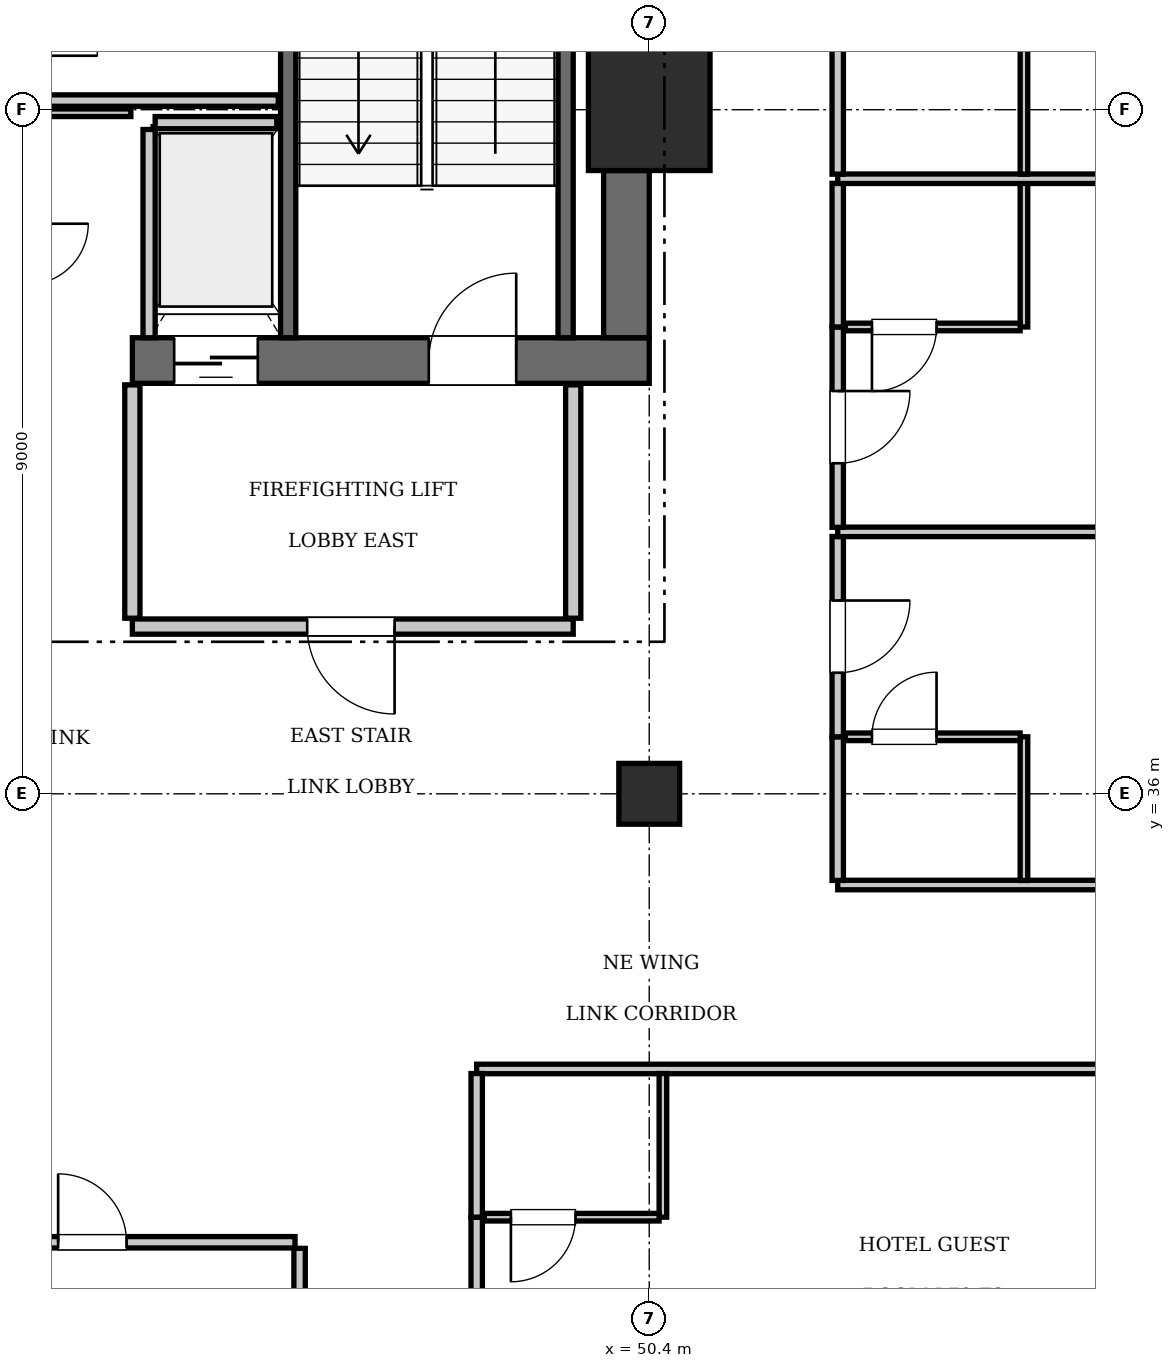
"""IFC4 building model, lengths in metres.
Left out: names, types, materials, properties, quantities, classifications, styles, units other than length and angle.
Written with IfcOpenShell. Run it as: python <this file> out.ifc"""

import sys

from ifc_helpers import new_model, si_unit, direction, frame, frame_2d, origin, origin_2d, place, context, subcontext, project, spatial, rectangle, extrude, element, fill, save


model = new_model("IFC4")
c1 = context("Model", 3, precision=1e-05, world=origin(), true_north=direction((0.0, 1.0)))
c2 = subcontext(c1, "Body", "Model", "MODEL_VIEW")
j1 = project(units=[si_unit("LENGTHUNIT", "METRE"), si_unit("PLANEANGLEUNIT", "RADIAN")], contexts=[c1])
p1 = place(None, origin())
s1 = spatial("IfcSite", under=j1, at=p1, CompositionType="ELEMENT")
p2 = place(p1, origin())
s2 = spatial("IfcBuilding", under=s1, at=p2, CompositionType="ELEMENT")
p3 = place(p2, frame((0.0, 0.0, 285.6)))
s3 = spatial("IfcBuildingStorey", under=s2, at=p3, CompositionType="ELEMENT", Elevation=285.6)
p4 = place(p3, frame((50.4, 45.0, 0.0), z_axis=(0.0, 0.0, 1.0), x_axis=(1.0, 0.0, 0.0)))
e1 = element("IfcColumn", 1, at=p4, inside=s3, PredefinedType="COLUMN", context=c2, shape_type="SweptSolid", body=[
    extrude(rectangle(XDim=1.6, YDim=1.6, at=origin_2d()), origin(), (0.0, 0.0, 1.0), 3.85),
])
p5 = place(p3, frame((43.6, 41.7, 0.0), z_axis=(0.0, 0.0, 1.0), x_axis=(1.0, 0.0, 0.0)))
e2 = element("IfcWall", 2, at=p5, inside=s3, PredefinedType="SHEAR", context=c2, shape_type="SweptSolid", body=[
    extrude(rectangle(XDim=6.8, YDim=0.6, at=frame_2d((3.4, 0.0))), origin(), (0.0, 0.0, 1.0), 3.85),
])
p6 = place(p5, frame((3.9, 0.0, 0.0)))
e3 = element("IfcOpeningElement", 3, at=p6, cuts=e2, PredefinedType="OPENING", context=c2, shape_type="SweptSolid", body=[
    extrude(rectangle(XDim=1.15, YDim=2.15, at=frame_2d((0.575, 1.075))), frame((0.0, 0.31, 0.0), z_axis=(0.0, -1.0, 0.0), x_axis=(1.0, 0.0, 0.0)), (0.0, 0.0, 1.0), 0.62),
])
p7 = place(p5, frame((0.55, 0.0, 0.0)))
e4 = element("IfcOpeningElement", 4, at=p7, cuts=e2, PredefinedType="OPENING", context=c2, shape_type="SweptSolid", body=[
    extrude(rectangle(XDim=1.1, YDim=2.2, at=frame_2d((0.55, 1.1))), frame((0.0, 0.31, 0.0), z_axis=(0.0, -1.0, 0.0), x_axis=(1.0, 0.0, 0.0)), (0.0, 0.0, 1.0), 0.62),
])
p8 = place(p3, frame((50.1, 42.0, 0.0), z_axis=(0.0, 0.0, 1.0), x_axis=(0.0, 1.0, 0.0)))
e5 = element("IfcWall", 5, at=p8, inside=s3, PredefinedType="SHEAR", context=c2, shape_type="SweptSolid", body=[
    extrude(rectangle(XDim=2.2, YDim=0.6, at=frame_2d((1.1, 0.0))), origin(), (0.0, 0.0, 1.0), 3.85),
])
p9 = place(p3, frame((50.4, 36.0, 0.0), z_axis=(0.0, 0.0, 1.0), x_axis=(1.0, 0.0, 0.0)))
e6 = element("IfcColumn", 6, at=p9, inside=s3, PredefinedType="COLUMN", context=c2, shape_type="SweptSolid", body=[
    extrude(rectangle(XDim=0.8, YDim=0.8, at=origin_2d()), origin(), (0.0, 0.0, 1.0), 3.85),
])
p10 = place(p3, frame((45.65, 42.0, 0.0), z_axis=(0.0, 0.0, 1.0), x_axis=(0.0, 1.0, 0.0)))
e7 = element("IfcWall", 7, at=p10, inside=s3, PredefinedType="SOLIDWALL", context=c2, shape_type="SweptSolid", body=[
    extrude(rectangle(XDim=9.15, YDim=0.2, at=frame_2d((4.575, 0.0))), origin(), (0.0, 0.0, 1.0), 3.61),
])
p11 = place(p3, frame((49.3, 42.0, 0.0), z_axis=(0.0, 0.0, 1.0), x_axis=(0.0, 1.0, 0.0)))
e8 = element("IfcWall", 8, at=p11, inside=s3, PredefinedType="SOLIDWALL", context=c2, shape_type="SweptSolid", body=[
    extrude(rectangle(XDim=9.12, YDim=0.2, at=frame_2d((4.56, 0.0))), origin(), (0.0, 0.0, 1.0), 3.61),
])
p12 = place(p3, frame((43.9, 44.83, 0.0), z_axis=(0.0, 0.0, 1.0), x_axis=(1.0, 0.0, 0.0)))
e9 = element("IfcWall", 9, at=p12, inside=s3, PredefinedType="SOLIDWALL", context=c2, shape_type="SweptSolid", body=[
    extrude(rectangle(XDim=1.6, YDim=0.16, at=frame_2d((0.8, 0.0))), origin(), (0.0, 0.0, 1.0), 3.61),
])
p13 = place(p3, frame((43.82, 42.0, 0.0), z_axis=(0.0, 0.0, 1.0), x_axis=(0.0, 1.0, 0.0)))
e10 = element("IfcWall", 10, at=p13, inside=s3, PredefinedType="SOLIDWALL", context=c2, shape_type="SweptSolid", body=[
    extrude(rectangle(XDim=2.74, YDim=0.16, at=frame_2d((1.37, 0.0))), origin(), (0.0, 0.0, 1.0), 3.61),
])
p14 = place(p3, frame((43.6, 38.2, 0.0), z_axis=(0.0, 0.0, 1.0), x_axis=(1.0, 0.0, 0.0)))
e11 = element("IfcWall", 11, at=p14, inside=s3, PredefinedType="PARTITIONING", context=c2, shape_type="SweptSolid", body=[
    extrude(rectangle(XDim=5.8, YDim=0.2, at=frame_2d((2.9, 0.0))), origin(), (0.0, 0.0, 1.0), 3.61),
])
p15 = place(p14, frame((2.3, 0.0, 0.0)))
e12 = element("IfcOpeningElement", 12, at=p15, cuts=e11, PredefinedType="OPENING", context=c2, shape_type="SweptSolid", body=[
    extrude(rectangle(XDim=1.15, YDim=2.15, at=frame_2d((0.575, 1.075))), frame((0.0, 0.11, 0.0), z_axis=(0.0, -1.0, 0.0), x_axis=(1.0, 0.0, 0.0)), (0.0, 0.0, 1.0), 0.22),
])
for number, where, z_axis, x_axis in (
    (13, (43.6, 38.31, 0.0), (0.0, 0.0, 1.0), (0.0, 1.0, 0.0)),
    (14, (49.4, 38.31, 0.0), (0.0, 0.0, 1.0), (0.0, 1.0, 0.0)),
):
    element("IfcWall", number, at=place(p3, frame(where, z_axis=z_axis, x_axis=x_axis)), inside=s3, PredefinedType="PARTITIONING", context=c2, shape_type="SweptSolid", body=[
        extrude(rectangle(XDim=3.07, YDim=0.2, at=frame_2d((1.535, 0.0))), origin(), (0.0, 0.0, 1.0), 3.61),
    ])
p16 = place(p3, frame((42.28, 44.96, 0.0), z_axis=(0.0, 0.0, 1.0), x_axis=(1.0, 0.0, 0.0)))
e15 = element("IfcWall", 15, at=p16, inside=s3, PredefinedType="PARTITIONING", context=c2, shape_type="SweptSolid", body=[
    extrude(rectangle(XDim=1.3, YDim=0.1, at=frame_2d((0.65, 0.0))), origin(), (0.0, 0.0, 1.0), 3.61),
])
p17 = place(p3, frame((42.38, 45.12, 0.0), z_axis=(0.0, 0.0, 1.0), x_axis=(1.0, 0.0, 0.0)))
e16 = element("IfcWall", 16, at=p17, inside=s3, PredefinedType="PARTITIONING", context=c2, shape_type="SweptSolid", body=[
    extrude(rectangle(XDim=3.14, YDim=0.15, at=frame_2d((1.57, 0.0))), origin(), (0.0, 0.0, 1.0), 3.61),
])
p18 = place(p3, frame((45.8, 22.33, 0.0), z_axis=(0.0, 0.0, 1.0), x_axis=(0.0, 1.0, 0.0)))
e17 = element("IfcWall", 17, at=p18, inside=s3, PredefinedType="PARTITIONING", context=c2, shape_type="SweptSolid", body=[
    extrude(rectangle(XDim=7.69, YDim=0.15, at=frame_2d((3.845, 0.0))), origin(), (0.0, 0.0, 1.0), 3.61),
])
p19 = place(p3, frame((40.407, 30.1, 0.0), z_axis=(0.0, 0.0, 1.0), x_axis=(1.0, 0.0, 0.0)))
e18 = element("IfcWall", 18, at=p19, inside=s3, PredefinedType="PARTITIONING", context=c2, shape_type="SweptSolid", body=[
    extrude(rectangle(XDim=5.333, YDim=0.15, at=frame_2d((2.667, 0.0))), origin(), (0.0, 0.0, 1.0), 3.61),
])
p20 = place(p19, frame((2.217, 0.0, 0.0)))
e19 = element("IfcOpeningElement", 19, at=p20, cuts=e18, PredefinedType="OPENING", context=c2, shape_type="SweptSolid", body=[
    extrude(rectangle(XDim=0.9, YDim=2.1, at=frame_2d((0.45, 1.05))), frame((0.0, 0.085, 0.0), z_axis=(0.0, -1.0, 0.0), x_axis=(1.0, 0.0, 0.0)), (0.0, 0.0, 1.0), 0.17),
])
p21 = place(p3, frame((48.13, 32.38, 0.0), z_axis=(0.0, 0.0, 1.0), x_axis=(1.0, 0.0, 0.0)))
e20 = element("IfcWall", 20, at=p21, inside=s3, PredefinedType="PARTITIONING", context=c2, shape_type="SweptSolid", body=[
    extrude(rectangle(XDim=11.97, YDim=0.125, at=frame_2d((5.985, 0.0))), origin(), (0.0, 0.0, 1.0), 3.61),
])
p22 = place(p3, frame((48.13, 27.4, 0.0), z_axis=(0.0, 0.0, 1.0), x_axis=(0.0, 1.0, 0.0)))
e21 = element("IfcWall", 21, at=p22, inside=s3, PredefinedType="PARTITIONING", context=c2, shape_type="SweptSolid", body=[
    extrude(rectangle(XDim=3.03, YDim=0.15, at=frame_2d((1.515, 0.0))), origin(), (0.0, 0.0, 1.0), 3.61),
])
p23 = place(p22, frame((1.04, 0.0, 0.0)))
e22 = element("IfcOpeningElement", 22, at=p23, cuts=e21, PredefinedType="OPENING", context=c2, shape_type="SweptSolid", body=[
    extrude(rectangle(XDim=0.95, YDim=2.15, at=frame_2d((0.475, 1.075))), frame((0.0, 0.085, 0.0), z_axis=(0.0, -1.0, 0.0), x_axis=(1.0, 0.0, 0.0)), (0.0, 0.0, 1.0), 0.17),
])
p24 = place(p3, frame((48.13, 30.43, 0.0), z_axis=(0.0, 0.0, 1.0), x_axis=(0.0, 1.0, 0.0)))
e23 = element("IfcWall", 23, at=p24, inside=s3, PredefinedType="PARTITIONING", context=c2, shape_type="SweptSolid", body=[
    extrude(rectangle(XDim=1.89, YDim=0.15, at=frame_2d((0.945, 0.0))), origin(), (0.0, 0.0, 1.0), 3.61),
])
p25 = place(p3, frame((50.58, 30.43, 0.0), z_axis=(0.0, 0.0, 1.0), x_axis=(0.0, 1.0, 0.0)))
e24 = element("IfcWall", 24, at=p25, inside=s3, PredefinedType="PARTITIONING", context=c2, shape_type="SweptSolid", body=[
    extrude(rectangle(XDim=1.89, YDim=0.1, at=frame_2d((0.945, 0.0))), origin(), (0.0, 0.0, 1.0), 3.61),
])
p26 = place(p3, frame((48.23, 30.43, 0.0), z_axis=(0.0, 0.0, 1.0), x_axis=(1.0, 0.0, 0.0)))
e25 = element("IfcWall", 25, at=p26, inside=s3, PredefinedType="PARTITIONING", context=c2, shape_type="SweptSolid", body=[
    extrude(rectangle(XDim=2.3, YDim=0.1, at=frame_2d((1.15, 0.0))), origin(), (0.0, 0.0, 1.0), 3.61),
])
p27 = place(p26, frame((0.35, 0.0, 0.0)))
e26 = element("IfcOpeningElement", 26, at=p27, cuts=e25, PredefinedType="OPENING", context=c2, shape_type="SweptSolid", body=[
    extrude(rectangle(XDim=0.85, YDim=2.1, at=frame_2d((0.425, 1.05))), frame((0.0, 0.06, 0.0), z_axis=(0.0, -1.0, 0.0), x_axis=(1.0, 0.0, 0.0)), (0.0, 0.0, 1.0), 0.12),
])
p28 = place(p3, frame((52.88, 34.8, 0.0), z_axis=(0.0, 0.0, 1.0), x_axis=(1.0, 0.0, 0.0)))
e27 = element("IfcWall", 27, at=p28, inside=s3, PredefinedType="PARTITIONING", context=c2, shape_type="SweptSolid", body=[
    extrude(rectangle(XDim=7.22, YDim=0.125, at=frame_2d((3.61, 0.0))), origin(), (0.0, 0.0, 1.0), 3.61),
])
p29 = place(p3, frame((52.88, 34.86, 0.0), z_axis=(0.0, 0.0, 1.0), x_axis=(0.0, 1.0, 0.0)))
e28 = element("IfcWall", 28, at=p29, inside=s3, PredefinedType="PARTITIONING", context=c2, shape_type="SweptSolid", body=[
    extrude(rectangle(XDim=1.89, YDim=0.15, at=frame_2d((0.945, 0.0))), origin(), (0.0, 0.0, 1.0), 3.61),
])
p30 = place(p3, frame((52.88, 36.75, 0.0), z_axis=(0.0, 0.0, 1.0), x_axis=(0.0, 1.0, 0.0)))
e29 = element("IfcWall", 29, at=p30, inside=s3, PredefinedType="PARTITIONING", context=c2, shape_type="SweptSolid", body=[
    extrude(rectangle(XDim=2.636, YDim=0.15, at=frame_2d((1.318, 0.0))), origin(), (0.0, 0.0, 1.0), 3.61),
])
p31 = place(p30, frame((0.843, 0.0, 0.0)))
e30 = element("IfcOpeningElement", 30, at=p31, cuts=e29, PredefinedType="OPENING", context=c2, shape_type="SweptSolid", body=[
    extrude(rectangle(XDim=0.95, YDim=2.15, at=frame_2d((0.475, 1.075))), frame((0.0, 0.085, 0.0), z_axis=(0.0, -1.0, 0.0), x_axis=(1.0, 0.0, 0.0)), (0.0, 0.0, 1.0), 0.17),
])
p32 = place(p3, frame((55.33, 34.86, 0.0), z_axis=(0.0, 0.0, 1.0), x_axis=(0.0, 1.0, 0.0)))
e31 = element("IfcWall", 31, at=p32, inside=s3, PredefinedType="PARTITIONING", context=c2, shape_type="SweptSolid", body=[
    extrude(rectangle(XDim=1.89, YDim=0.1, at=frame_2d((0.945, 0.0))), origin(), (0.0, 0.0, 1.0), 3.61),
])
p33 = place(p3, frame((52.98, 36.75, 0.0), z_axis=(0.0, 0.0, 1.0), x_axis=(1.0, 0.0, 0.0)))
e32 = element("IfcWall", 32, at=p33, inside=s3, PredefinedType="PARTITIONING", context=c2, shape_type="SweptSolid", body=[
    extrude(rectangle(XDim=2.3, YDim=0.1, at=frame_2d((1.15, 0.0))), origin(), (0.0, 0.0, 1.0), 3.61),
])
p34 = place(p33, frame((0.35, 0.0, 0.0)))
e33 = element("IfcOpeningElement", 33, at=p34, cuts=e32, PredefinedType="OPENING", context=c2, shape_type="SweptSolid", body=[
    extrude(rectangle(XDim=0.85, YDim=2.1, at=frame_2d((0.425, 1.05))), frame((0.0, 0.06, 0.0), z_axis=(0.0, -1.0, 0.0), x_axis=(1.0, 0.0, 0.0)), (0.0, 0.0, 1.0), 0.12),
])
p35 = place(p3, frame((52.88, 39.446, 0.0), z_axis=(0.0, 0.0, 1.0), x_axis=(1.0, 0.0, 0.0)))
e34 = element("IfcWall", 34, at=p35, inside=s3, PredefinedType="PARTITIONING", context=c2, shape_type="SweptSolid", body=[
    extrude(rectangle(XDim=7.22, YDim=0.125, at=frame_2d((3.61, 0.0))), origin(), (0.0, 0.0, 1.0), 3.61),
])
p36 = place(p3, frame((52.88, 39.506, 0.0), z_axis=(0.0, 0.0, 1.0), x_axis=(0.0, 1.0, 0.0)))
e35 = element("IfcWall", 35, at=p36, inside=s3, PredefinedType="PARTITIONING", context=c2, shape_type="SweptSolid", body=[
    extrude(rectangle(XDim=2.636, YDim=0.15, at=frame_2d((1.318, 0.0))), origin(), (0.0, 0.0, 1.0), 3.61),
])
p37 = place(p36, frame((0.843, 0.0, 0.0)))
e36 = element("IfcOpeningElement", 36, at=p37, cuts=e35, PredefinedType="OPENING", context=c2, shape_type="SweptSolid", body=[
    extrude(rectangle(XDim=0.95, YDim=2.15, at=frame_2d((0.475, 1.075))), frame((0.0, 0.085, 0.0), z_axis=(0.0, -1.0, 0.0), x_axis=(1.0, 0.0, 0.0)), (0.0, 0.0, 1.0), 0.17),
])
p38 = place(p3, frame((52.88, 42.142, 0.0), z_axis=(0.0, 0.0, 1.0), x_axis=(0.0, 1.0, 0.0)))
e37 = element("IfcWall", 37, at=p38, inside=s3, PredefinedType="PARTITIONING", context=c2, shape_type="SweptSolid", body=[
    extrude(rectangle(XDim=1.89, YDim=0.15, at=frame_2d((0.945, 0.0))), origin(), (0.0, 0.0, 1.0), 3.61),
])
p39 = place(p3, frame((55.33, 42.142, 0.0), z_axis=(0.0, 0.0, 1.0), x_axis=(0.0, 1.0, 0.0)))
e38 = element("IfcWall", 38, at=p39, inside=s3, PredefinedType="PARTITIONING", context=c2, shape_type="SweptSolid", body=[
    extrude(rectangle(XDim=1.89, YDim=0.1, at=frame_2d((0.945, 0.0))), origin(), (0.0, 0.0, 1.0), 3.61),
])
p40 = place(p3, frame((52.98, 42.142, 0.0), z_axis=(0.0, 0.0, 1.0), x_axis=(1.0, 0.0, 0.0)))
e39 = element("IfcWall", 39, at=p40, inside=s3, PredefinedType="PARTITIONING", context=c2, shape_type="SweptSolid", body=[
    extrude(rectangle(XDim=2.3, YDim=0.1, at=frame_2d((1.15, 0.0))), origin(), (0.0, 0.0, 1.0), 3.61),
])
p41 = place(p40, frame((0.35, 0.0, 0.0)))
e40 = element("IfcOpeningElement", 40, at=p41, cuts=e39, PredefinedType="OPENING", context=c2, shape_type="SweptSolid", body=[
    extrude(rectangle(XDim=0.85, YDim=2.1, at=frame_2d((0.425, 1.05))), frame((0.0, 0.06, 0.0), z_axis=(0.0, -1.0, 0.0), x_axis=(1.0, 0.0, 0.0)), (0.0, 0.0, 1.0), 0.12),
])
p42 = place(p3, frame((52.88, 44.092, 0.0), z_axis=(0.0, 0.0, 1.0), x_axis=(1.0, 0.0, 0.0)))
e41 = element("IfcWall", 41, at=p42, inside=s3, PredefinedType="PARTITIONING", context=c2, shape_type="SweptSolid", body=[
    extrude(rectangle(XDim=7.22, YDim=0.125, at=frame_2d((3.61, 0.0))), origin(), (0.0, 0.0, 1.0), 3.61),
])
p43 = place(p3, frame((52.88, 44.152, 0.0), z_axis=(0.0, 0.0, 1.0), x_axis=(0.0, 1.0, 0.0)))
e42 = element("IfcWall", 42, at=p43, inside=s3, PredefinedType="PARTITIONING", context=c2, shape_type="SweptSolid", body=[
    extrude(rectangle(XDim=1.89, YDim=0.15, at=frame_2d((0.945, 0.0))), origin(), (0.0, 0.0, 1.0), 3.61),
])
p44 = place(p3, frame((55.33, 44.152, 0.0), z_axis=(0.0, 0.0, 1.0), x_axis=(0.0, 1.0, 0.0)))
e43 = element("IfcWall", 43, at=p44, inside=s3, PredefinedType="PARTITIONING", context=c2, shape_type="SweptSolid", body=[
    extrude(rectangle(XDim=1.89, YDim=0.1, at=frame_2d((0.945, 0.0))), origin(), (0.0, 0.0, 1.0), 3.61),
])
p45 = place(p6, origin())
e44 = element("IfcDoor", 44, at=p45, inside=s3, OperationType="SINGLE_SWING_RIGHT", PredefinedType="DOOR", context=c2, shape_type="SweptSolid", body=[
    extrude(rectangle(XDim=1.15, YDim=2.15, at=frame_2d((0.575, 1.075))), frame((0.0, 0.025, 0.0), z_axis=(0.0, -1.0, 0.0), x_axis=(1.0, 0.0, 0.0)), (0.0, 0.0, 1.0), 0.05),
])
fill(e3, e44)
p46 = place(p7, frame((1.1, 0.0, 0.0), z_axis=(0.0, 0.0, 1.0), x_axis=(-1.0, 0.0, 0.0)))
e45 = element("IfcDoor", 45, at=p46, inside=s3, OperationType="SLIDING_TO_LEFT", PredefinedType="DOOR", context=c2, shape_type="SweptSolid", body=[
    extrude(rectangle(XDim=1.1, YDim=2.2, at=frame_2d((0.55, 1.1))), frame((0.0, 0.025, 0.0), z_axis=(0.0, -1.0, 0.0), x_axis=(1.0, 0.0, 0.0)), (0.0, 0.0, 1.0), 0.05),
])
fill(e4, e45)
p47 = place(p15, frame((1.15, 0.0, 0.0), z_axis=(0.0, 0.0, 1.0), x_axis=(-1.0, 0.0, 0.0)))
e46 = element("IfcDoor", 46, at=p47, inside=s3, OperationType="SINGLE_SWING_LEFT", PredefinedType="DOOR", context=c2, shape_type="SweptSolid", body=[
    extrude(rectangle(XDim=1.15, YDim=2.15, at=frame_2d((0.575, 1.075))), frame((0.0, 0.025, 0.0), z_axis=(0.0, -1.0, 0.0), x_axis=(1.0, 0.0, 0.0)), (0.0, 0.0, 1.0), 0.05),
])
fill(e12, e46)
p48 = place(p20, origin())
e47 = element("IfcDoor", 47, at=p48, inside=s3, OperationType="SINGLE_SWING_LEFT", PredefinedType="DOOR", context=c2, shape_type="SweptSolid", body=[
    extrude(rectangle(XDim=0.9, YDim=2.1, at=frame_2d((0.45, 1.05))), frame((0.0, 0.025, 0.0), z_axis=(0.0, -1.0, 0.0), x_axis=(1.0, 0.0, 0.0)), (0.0, 0.0, 1.0), 0.05),
])
fill(e19, e47)
p49 = place(p27, frame((0.85, 0.0, 0.0), z_axis=(0.0, 0.0, 1.0), x_axis=(-1.0, 0.0, 0.0)))
e48 = element("IfcDoor", 48, at=p49, inside=s3, OperationType="SINGLE_SWING_RIGHT", PredefinedType="DOOR", context=c2, shape_type="SweptSolid", body=[
    extrude(rectangle(XDim=0.85, YDim=2.1, at=frame_2d((0.425, 1.05))), frame((0.0, 0.025, 0.0), z_axis=(0.0, -1.0, 0.0), x_axis=(1.0, 0.0, 0.0)), (0.0, 0.0, 1.0), 0.05),
])
fill(e26, e48)
p50 = place(p34, origin())
e49 = element("IfcDoor", 49, at=p50, inside=s3, OperationType="SINGLE_SWING_RIGHT", PredefinedType="DOOR", context=c2, shape_type="SweptSolid", body=[
    extrude(rectangle(XDim=0.85, YDim=2.1, at=frame_2d((0.425, 1.05))), frame((0.0, 0.025, 0.0), z_axis=(0.0, -1.0, 0.0), x_axis=(1.0, 0.0, 0.0)), (0.0, 0.0, 1.0), 0.05),
])
fill(e33, e49)
p51 = place(p31, frame((0.95, 0.0, 0.0), z_axis=(0.0, 0.0, 1.0), x_axis=(-1.0, 0.0, 0.0)))
e50 = element("IfcDoor", 50, at=p51, inside=s3, OperationType="SINGLE_SWING_LEFT", PredefinedType="DOOR", context=c2, shape_type="SweptSolid", body=[
    extrude(rectangle(XDim=0.95, YDim=2.15, at=frame_2d((0.475, 1.075))), frame((0.0, 0.025, 0.0), z_axis=(0.0, -1.0, 0.0), x_axis=(1.0, 0.0, 0.0)), (0.0, 0.0, 1.0), 0.05),
])
fill(e30, e50)
p52 = place(p41, frame((0.85, 0.0, 0.0), z_axis=(0.0, 0.0, 1.0), x_axis=(-1.0, 0.0, 0.0)))
e51 = element("IfcDoor", 51, at=p52, inside=s3, OperationType="SINGLE_SWING_RIGHT", PredefinedType="DOOR", context=c2, shape_type="SweptSolid", body=[
    extrude(rectangle(XDim=0.85, YDim=2.1, at=frame_2d((0.425, 1.05))), frame((0.0, 0.025, 0.0), z_axis=(0.0, -1.0, 0.0), x_axis=(1.0, 0.0, 0.0)), (0.0, 0.0, 1.0), 0.05),
])
fill(e40, e51)
p53 = place(p37, frame((0.95, 0.0, 0.0), z_axis=(0.0, 0.0, 1.0), x_axis=(-1.0, 0.0, 0.0)))
e52 = element("IfcDoor", 52, at=p53, inside=s3, OperationType="SINGLE_SWING_LEFT", PredefinedType="DOOR", context=c2, shape_type="SweptSolid", body=[
    extrude(rectangle(XDim=0.95, YDim=2.15, at=frame_2d((0.475, 1.075))), frame((0.0, 0.025, 0.0), z_axis=(0.0, -1.0, 0.0), x_axis=(1.0, 0.0, 0.0)), (0.0, 0.0, 1.0), 0.05),
])
fill(e36, e52)
save(model, sys.argv[1])
